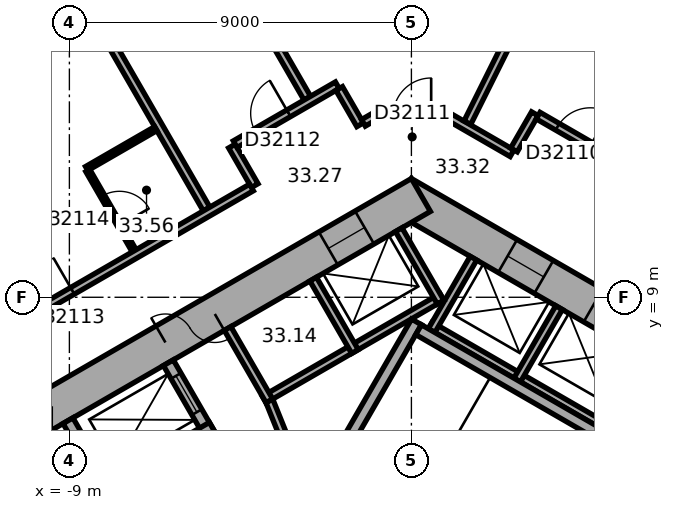
"""IFC4 building model, lengths in metres.
Left out: names, types, materials, properties, quantities, classifications, styles, units other than length and angle.
Written with IfcOpenShell. Run it as: python <this file> out.ifc"""

import sys

from ifc_helpers import new_model, si_unit, direction, frame, frame_2d, origin, place, context, subcontext, project, spatial, rectangle, extrude, element, fill, save


model = new_model("IFC4")
c1 = context("Model", 3, precision=1e-05, world=origin(), true_north=direction((0.0, 1.0)))
c2 = subcontext(c1, "Body", "Model", "MODEL_VIEW")
j1 = project(units=[si_unit("LENGTHUNIT", "METRE"), si_unit("PLANEANGLEUNIT", "RADIAN")], contexts=[c1])
p1 = place(None, origin())
s1 = spatial("IfcSite", under=j1, at=p1, CompositionType="ELEMENT")
p2 = place(p1, origin())
s2 = spatial("IfcBuilding", under=s1, at=p2, CompositionType="ELEMENT")
p3 = place(p2, frame((0.0, 0.0, 135.5)))
s3 = spatial("IfcBuildingStorey", under=s2, at=p3, CompositionType="ELEMENT", Elevation=135.5)
p4 = place(p3, frame((10.25, 5.629, 0.0), z_axis=(0.0, 0.0, 1.0), x_axis=(-0.866022616891, 0.50000482701, 0.0)))
e1 = element("IfcWall", 1, at=p4, inside=s3, PredefinedType="SHEAR", context=c2, shape_type="SweptSolid", body=[
    extrude(rectangle(XDim=12.125, YDim=1.0, at=frame_2d((6.062, 0.0))), origin(), (0.0, 0.0, 1.0), 3.7),
])
p5 = place(p4, frame((2.612, 0.0, 0.0)))
e2 = element("IfcOpeningElement", 2, at=p5, cuts=e1, PredefinedType="OPENING", context=c2, shape_type="SweptSolid", body=[
    extrude(rectangle(XDim=1.1, YDim=2.1, at=frame_2d((0.55, 1.05))), frame((0.0, 0.51, 0.0), z_axis=(0.0, -1.0, 0.0), x_axis=(1.0, 0.0, 0.0)), (0.0, 0.0, 1.0), 1.02),
])
p6 = place(p4, frame((5.212, 0.0, 0.0)))
e3 = element("IfcOpeningElement", 3, at=p6, cuts=e1, PredefinedType="OPENING", context=c2, shape_type="SweptSolid", body=[
    extrude(rectangle(XDim=1.1, YDim=2.1, at=frame_2d((0.55, 1.05))), frame((0.0, 0.51, 0.0), z_axis=(0.0, -1.0, 0.0), x_axis=(1.0, 0.0, 0.0)), (0.0, 0.0, 1.0), 1.02),
])
p7 = place(p4, frame((7.812, 0.0, 0.0)))
e4 = element("IfcOpeningElement", 4, at=p7, cuts=e1, PredefinedType="OPENING", context=c2, shape_type="SweptSolid", body=[
    extrude(rectangle(XDim=1.1, YDim=2.1, at=frame_2d((0.55, 1.05))), frame((0.0, 0.51, 0.0), z_axis=(0.0, -1.0, 0.0), x_axis=(1.0, 0.0, 0.0)), (0.0, 0.0, 1.0), 1.02),
])
p8 = place(p3, frame((0.25, 11.691, 0.0), z_axis=(0.0, 0.0, 1.0), x_axis=(-0.866022616891, -0.50000482701, 0.0)))
e5 = element("IfcWall", 5, at=p8, inside=s3, PredefinedType="SHEAR", context=c2, shape_type="SweptSolid", body=[
    extrude(rectangle(XDim=12.125, YDim=1.0, at=frame_2d((6.062, 0.0))), origin(), (0.0, 0.0, 1.0), 3.7),
])
p9 = place(p8, frame((6.262, 0.0, 0.0)))
e6 = element("IfcOpeningElement", 6, at=p9, cuts=e5, PredefinedType="OPENING", context=c2, shape_type="SweptSolid", body=[
    extrude(rectangle(XDim=1.5, YDim=2.1, at=frame_2d((0.75, 1.05))), frame((0.0, 0.51, 0.0), z_axis=(0.0, -1.0, 0.0), x_axis=(1.0, 0.0, 0.0)), (0.0, 0.0, 1.0), 1.02),
])
p10 = place(p8, frame((1.712, 0.0, 0.0)))
e7 = element("IfcOpeningElement", 7, at=p10, cuts=e5, PredefinedType="OPENING", context=c2, shape_type="SweptSolid", body=[
    extrude(rectangle(XDim=1.1, YDim=2.1, at=frame_2d((0.55, 1.05))), frame((0.0, 0.51, 0.0), z_axis=(0.0, -1.0, 0.0), x_axis=(1.0, 0.0, 0.0)), (0.0, 0.0, 1.0), 1.02),
])
p11 = place(p3, frame((19.464, 14.599, 0.0), z_axis=(0.0, 0.0, 1.0), x_axis=(-0.894935755043, 0.446195018289, 0.0)))
e8 = element("IfcWall", 8, at=p11, inside=s3, PredefinedType="STANDARD", context=c2, shape_type="SweptSolid", body=[
    extrude(rectangle(XDim=20.044, YDim=0.2, at=frame_2d((10.022, 0.0))), origin(), (0.0, 0.0, 1.0), 3.7),
])
p12 = place(p11, frame((1.313, 0.0, 0.9)))
e9 = element("IfcOpeningElement", 9, at=p12, cuts=e8, PredefinedType="OPENING", context=c2, shape_type="SweptSolid", body=[
    extrude(rectangle(XDim=2.4, YDim=2.0, at=frame_2d((1.2, 1.0))), frame((0.0, 0.11, 0.0), z_axis=(0.0, -1.0, 0.0), x_axis=(1.0, 0.0, 0.0)), (0.0, 0.0, 1.0), 0.22),
])
p13 = place(p11, frame((5.067, 0.0, 0.9)))
e10 = element("IfcOpeningElement", 10, at=p13, cuts=e8, PredefinedType="OPENING", context=c2, shape_type="SweptSolid", body=[
    extrude(rectangle(XDim=2.4, YDim=2.0, at=frame_2d((1.2, 1.0))), frame((0.0, 0.11, 0.0), z_axis=(0.0, -1.0, 0.0), x_axis=(1.0, 0.0, 0.0)), (0.0, 0.0, 1.0), 0.22),
])
p14 = place(p11, frame((8.821, 0.0, 0.9)))
e11 = element("IfcOpeningElement", 11, at=p14, cuts=e8, PredefinedType="OPENING", context=c2, shape_type="SweptSolid", body=[
    extrude(rectangle(XDim=2.4, YDim=2.0, at=frame_2d((1.2, 1.0))), frame((0.0, 0.11, 0.0), z_axis=(0.0, -1.0, 0.0), x_axis=(1.0, 0.0, 0.0)), (0.0, 0.0, 1.0), 0.22),
])
p15 = place(p11, frame((12.575, 0.0, 0.9)))
e12 = element("IfcOpeningElement", 12, at=p15, cuts=e8, PredefinedType="OPENING", context=c2, shape_type="SweptSolid", body=[
    extrude(rectangle(XDim=2.4, YDim=2.0, at=frame_2d((1.2, 1.0))), frame((0.0, 0.11, 0.0), z_axis=(0.0, -1.0, 0.0), x_axis=(1.0, 0.0, 0.0)), (0.0, 0.0, 1.0), 0.22),
])
p16 = place(p11, frame((16.329, 0.0, 0.9)))
e13 = element("IfcOpeningElement", 13, at=p16, cuts=e8, PredefinedType="OPENING", context=c2, shape_type="SweptSolid", body=[
    extrude(rectangle(XDim=2.4, YDim=2.0, at=frame_2d((1.2, 1.0))), frame((0.0, 0.11, 0.0), z_axis=(0.0, -1.0, 0.0), x_axis=(1.0, 0.0, 0.0)), (0.0, 0.0, 1.0), 0.22),
])
p17 = place(p3, frame((-2.961, 23.405, 0.0), z_axis=(0.0, 0.0, 1.0), x_axis=(-0.866023315909, -0.500003616288, 0.0)))
e14 = element("IfcWall", 14, at=p17, inside=s3, PredefinedType="STANDARD", context=c2, shape_type="SweptSolid", body=[
    extrude(rectangle(XDim=20.044, YDim=0.2, at=frame_2d((10.022, 0.0))), origin(), (0.0, 0.0, 1.0), 3.7),
])
p18 = place(p17, frame((1.314, 0.0, 0.9)))
e15 = element("IfcOpeningElement", 15, at=p18, cuts=e14, PredefinedType="OPENING", context=c2, shape_type="SweptSolid", body=[
    extrude(rectangle(XDim=2.4, YDim=2.0, at=frame_2d((1.2, 1.0))), frame((0.0, 0.11, 0.0), z_axis=(0.0, -1.0, 0.0), x_axis=(1.0, 0.0, 0.0)), (0.0, 0.0, 1.0), 0.22),
])
p19 = place(p17, frame((5.069, 0.0, 0.9)))
e16 = element("IfcOpeningElement", 16, at=p19, cuts=e14, PredefinedType="OPENING", context=c2, shape_type="SweptSolid", body=[
    extrude(rectangle(XDim=2.4, YDim=2.0, at=frame_2d((1.2, 1.0))), frame((0.0, 0.11, 0.0), z_axis=(0.0, -1.0, 0.0), x_axis=(1.0, 0.0, 0.0)), (0.0, 0.0, 1.0), 0.22),
])
p20 = place(p17, frame((8.823, 0.0, 0.9)))
e17 = element("IfcOpeningElement", 17, at=p20, cuts=e14, PredefinedType="OPENING", context=c2, shape_type="SweptSolid", body=[
    extrude(rectangle(XDim=2.4, YDim=2.0, at=frame_2d((1.2, 1.0))), frame((0.0, 0.11, 0.0), z_axis=(0.0, -1.0, 0.0), x_axis=(1.0, 0.0, 0.0)), (0.0, 0.0, 1.0), 0.22),
])
p21 = place(p17, frame((12.577, 0.0, 0.9)))
e18 = element("IfcOpeningElement", 18, at=p21, cuts=e14, PredefinedType="OPENING", context=c2, shape_type="SweptSolid", body=[
    extrude(rectangle(XDim=2.4, YDim=2.0, at=frame_2d((1.2, 1.0))), frame((0.0, 0.11, 0.0), z_axis=(0.0, -1.0, 0.0), x_axis=(1.0, 0.0, 0.0)), (0.0, 0.0, 1.0), 0.22),
])
p22 = place(p17, frame((16.331, 0.0, 0.9)))
e19 = element("IfcOpeningElement", 19, at=p22, cuts=e14, PredefinedType="OPENING", context=c2, shape_type="SweptSolid", body=[
    extrude(rectangle(XDim=2.4, YDim=2.0, at=frame_2d((1.2, 1.0))), frame((0.0, 0.11, 0.0), z_axis=(0.0, -1.0, 0.0), x_axis=(1.0, 0.0, 0.0)), (0.0, 0.0, 1.0), 0.22),
])
p23 = place(p3, frame((7.424, 4.259, 0.0), z_axis=(0.0, 0.0, 1.0), x_axis=(-0.866026010844, 0.49999894854, 0.0)))
e20 = element("IfcWall", 20, at=p23, inside=s3, PredefinedType="PARTITIONING", context=c2, shape_type="SweptSolid", body=[
    extrude(rectangle(XDim=8.0, YDim=0.2, at=frame_2d((4.0, 0.0))), origin(), (0.0, 0.0, 1.0), 3.35),
])
for number, where, z_axis, x_axis in (
    (21, (2.784, 6.822, 0.0), (0.0, 0.0, 1.0), (0.5, 0.866, 0.0)),
    (22, (0.532, 8.122, 0.0), (0.0, 0.0, 1.0), (0.5, 0.866, 0.0)),
):
    element("IfcWall", number, at=place(p3, frame(where, z_axis=z_axis, x_axis=x_axis)), inside=s3, PredefinedType="PARTITIONING", context=c2, shape_type="SweptSolid", body=[
        extrude(rectangle(XDim=2.2, YDim=0.2, at=frame_2d((1.1, 0.0))), origin(), (0.0, 0.0, 1.0), 3.35),
    ])
p24 = place(p3, frame((0.803, 9.009, 0.0), z_axis=(0.0, 0.0, 1.0), x_axis=(-0.866028230842, -0.499995103361, 0.0)))
e23 = element("IfcWall", 23, at=p24, inside=s3, PredefinedType="PARTITIONING", context=c2, shape_type="SweptSolid", body=[
    extrude(rectangle(XDim=5.4, YDim=0.2, at=frame_2d((2.7, 0.0))), origin(), (0.0, 0.0, 1.0), 3.35),
])
p25 = place(p3, frame((0.767, 8.872, 0.0), z_axis=(0.0, 0.0, 1.0), x_axis=(-0.499994660107, 0.866028486751, 0.0)))
e24 = element("IfcWall", 24, at=p25, inside=s3, PredefinedType="PARTITIONING", context=c2, shape_type="SweptSolid", body=[
    extrude(rectangle(XDim=2.2, YDim=0.2, at=frame_2d((1.1, 0.0))), origin(), (0.0, 0.0, 1.0), 3.35),
])
for number, where, z_axis, x_axis in (
    (25, (-1.485, 7.572, 0.0), (0.0, 0.0, 1.0), (-0.5, 0.866, 0.0)),
    (26, (-3.737, 6.272, 0.0), (0.0, 0.0, 1.0), (-0.5, 0.866, 0.0)),
):
    element("IfcWall", number, at=place(p3, frame(where, z_axis=z_axis, x_axis=x_axis)), inside=s3, PredefinedType="PARTITIONING", context=c2, shape_type="SweptSolid", body=[
        extrude(rectangle(XDim=2.2, YDim=0.2, at=frame_2d((1.1, 0.0))), origin(), (0.0, 0.0, 1.0), 3.35),
    ])
p26 = place(p3, frame((-2.216, 4.282, 0.0), z_axis=(0.0, 0.0, 1.0), x_axis=(0.499977259774, 0.866038532462, 0.0)))
e27 = element("IfcWall", 27, at=p26, inside=s3, PredefinedType="SHEAR", context=c2, shape_type="SweptSolid", body=[
    extrude(rectangle(XDim=4.7, YDim=0.3, at=frame_2d((2.35, 0.0))), origin(), (0.0, 0.0, 1.0), 3.35),
])
p27 = place(p3, frame((6.303, 4.617, 0.0), z_axis=(0.0, 0.0, 1.0), x_axis=(-0.866027801685, 0.499995846692, 0.0)))
e28 = element("IfcWall", 28, at=p27, inside=s3, PredefinedType="SHEAR", context=c2, shape_type="SweptSolid", body=[
    extrude(rectangle(XDim=7.06, YDim=0.3, at=frame_2d((3.53, 0.0))), origin(), (0.0, 0.0, 1.0), 3.35),
])
p28 = place(p3, frame((-5.295, 5.372, 0.0), z_axis=(0.0, 0.0, 1.0), x_axis=(-0.500077893725, 0.86598042715, 0.0)))
e29 = element("IfcWall", 29, at=p28, inside=s3, PredefinedType="SHEAR", context=c2, shape_type="SweptSolid", body=[
    extrude(rectangle(XDim=2.2, YDim=0.3, at=frame_2d((1.1, 0.0))), origin(), (0.0, 0.0, 1.0), 3.35),
])
p29 = place(p28, frame((0.7, 0.0, 0.0)))
e30 = element("IfcOpeningElement", 30, at=p29, cuts=e29, PredefinedType="OPENING", context=c2, shape_type="SweptSolid", body=[
    extrude(rectangle(XDim=1.1, YDim=2.1, at=frame_2d((0.55, 1.05))), frame((0.0, 0.16, 0.0), z_axis=(0.0, -1.0, 0.0), x_axis=(1.0, 0.0, 0.0)), (0.0, 0.0, 1.0), 0.32),
])
p30 = place(p3, frame((-5.24, 5.577, 0.0), z_axis=(0.0, 0.0, 1.0), x_axis=(-0.866014461049, -0.500018952895, 0.0)))
e31 = element("IfcWall", 31, at=p30, inside=s3, PredefinedType="SHEAR", context=c2, shape_type="SweptSolid", body=[
    extrude(rectangle(XDim=3.35, YDim=0.3, at=frame_2d((1.675, 0.0))), origin(), (0.0, 0.0, 1.0), 3.35),
])
p31 = place(p3, frame((-7.937, 3.847, 0.0), z_axis=(0.0, 0.0, 1.0), x_axis=(-0.50002983664, 0.866008176907, 0.0)))
e32 = element("IfcWall", 32, at=p31, inside=s3, PredefinedType="SHEAR", context=c2, shape_type="SweptSolid", body=[
    extrude(rectangle(XDim=2.2, YDim=0.3, at=frame_2d((1.1, 0.0))), origin(), (0.0, 0.0, 1.0), 3.35),
])
p32 = place(p3, frame((-2.615, 3.487, 0.0), z_axis=(0.0, 0.0, 1.0), x_axis=(-0.373576831041, 0.92759924068, 0.0)))
e33 = element("IfcWall", 33, at=p32, inside=s3, PredefinedType="PARTITIONING", context=c2, shape_type="SweptSolid", body=[
    extrude(rectangle(XDim=3.002, YDim=0.2, at=frame_2d((1.501, 0.0))), origin(), (0.0, 0.0, 1.0), 3.35),
])
p33 = place(p3, frame((-9.515, 18.466, 0.0), z_axis=(0.0, 0.0, 1.0), x_axis=(0.500009360108, -0.866019999656, 0.0)))
e34 = element("IfcWall", 34, at=p33, inside=s3, PredefinedType="PARTITIONING", context=c2, shape_type="SweptSolid", body=[
    extrude(rectangle(XDim=8.25, YDim=0.2, at=frame_2d((4.125, 0.0))), origin(), (0.0, 0.0, 1.0), 2.55),
])
p34 = place(p3, frame((-8.545, 12.387, 0.0), z_axis=(0.0, 0.0, 1.0), x_axis=(0.866009402589, 0.500027713859, 0.0)))
e35 = element("IfcWall", 35, at=p34, inside=s3, PredefinedType="PARTITIONING", context=c2, shape_type="SweptSolid", body=[
    extrude(rectangle(XDim=2.1, YDim=0.12, at=frame_2d((1.05, 0.0))), origin(), (0.0, 0.0, 1.0), 3.35),
])
p35 = place(p3, frame((-7.295, 10.222, 0.0), z_axis=(0.0, 0.0, 1.0), x_axis=(-0.500002508028, 0.866023955769, 0.0)))
e36 = element("IfcWall", 36, at=p35, inside=s3, PredefinedType="PARTITIONING", context=c2, shape_type="SweptSolid", body=[
    extrude(rectangle(XDim=2.44, YDim=0.12, at=frame_2d((1.22, 0.0))), origin(), (0.0, 0.0, 1.0), 3.35),
])
p36 = place(p35, frame((0.77, 0.0, 0.0)))
e37 = element("IfcOpeningElement", 37, at=p36, cuts=e36, PredefinedType="OPENING", context=c2, shape_type="SweptSolid", body=[
    extrude(rectangle(XDim=0.9, YDim=2.1, at=frame_2d((0.45, 1.05))), frame((0.0, 0.07, 0.0), z_axis=(0.0, -1.0, 0.0), x_axis=(1.0, 0.0, 0.0)), (0.0, 0.0, 1.0), 0.14),
])
p37 = place(p3, frame((-6.264, 20.344, 0.0), z_axis=(0.0, 0.0, 1.0), x_axis=(0.500009260695, -0.866020057054, 0.0)))
e38 = element("IfcWall", 38, at=p37, inside=s3, PredefinedType="PARTITIONING", context=c2, shape_type="SweptSolid", body=[
    extrude(rectangle(XDim=7.049, YDim=0.2, at=frame_2d((3.524, 0.0))), origin(), (0.0, 0.0, 1.0), 3.35),
])
p38 = place(p3, frame((-4.723, 12.978, 0.0), z_axis=(0.0, 0.0, 1.0), x_axis=(0.500074377092, -0.865982457891, 0.0)))
e39 = element("IfcWall", 39, at=p38, inside=s3, PredefinedType="PARTITIONING", context=c2, shape_type="SweptSolid", body=[
    extrude(rectangle(XDim=1.201, YDim=0.2, at=frame_2d((0.601, 0.0))), origin(), (0.0, 0.0, 1.0), 3.35),
])
p39 = place(p3, frame((-4.209, 11.888, 0.0), z_axis=(0.0, 0.0, 1.0), x_axis=(-0.866020930448, -0.500007747966, 0.0)))
e40 = element("IfcWall", 40, at=p39, inside=s3, PredefinedType="PARTITIONING", context=c2, shape_type="SweptSolid", body=[
    extrude(rectangle(XDim=8.321, YDim=0.2, at=frame_2d((4.161, 0.0))), origin(), (0.0, 0.0, 1.0), 3.35),
])
p40 = place(p39, frame((5.439, 0.0, 0.0)))
e41 = element("IfcOpeningElement", 41, at=p40, cuts=e40, PredefinedType="OPENING", context=c2, shape_type="SweptSolid", body=[
    extrude(rectangle(XDim=1.0, YDim=2.1, at=frame_2d((0.5, 1.05))), frame((0.0, 0.11, 0.0), z_axis=(0.0, -1.0, 0.0), x_axis=(1.0, 0.0, 0.0)), (0.0, 0.0, 1.0), 0.22),
])
p41 = place(p3, frame((-1.95, 14.579, 0.0), z_axis=(0.0, 0.0, 1.0), x_axis=(-0.866011260204, -0.500024496599, 0.0)))
e42 = element("IfcWall", 42, at=p41, inside=s3, PredefinedType="PARTITIONING", context=c2, shape_type="SweptSolid", body=[
    extrude(rectangle(XDim=3.102, YDim=0.2, at=frame_2d((1.551, 0.0))), origin(), (0.0, 0.0, 1.0), 3.35),
])
p42 = place(p41, frame((1.478, 0.0, 0.0)))
e43 = element("IfcOpeningElement", 43, at=p42, cuts=e42, PredefinedType="OPENING", context=c2, shape_type="SweptSolid", body=[
    extrude(rectangle(XDim=1.0, YDim=2.1, at=frame_2d((0.5, 1.05))), frame((0.0, 0.11, 0.0), z_axis=(0.0, -1.0, 0.0), x_axis=(1.0, 0.0, 0.0)), (0.0, 0.0, 1.0), 0.22),
])
p43 = place(p3, frame((-1.349, 13.539, 0.0), z_axis=(0.0, 0.0, 1.0), x_axis=(-0.500074377092, 0.865982457891, 0.0)))
e44 = element("IfcWall", 44, at=p43, inside=s3, PredefinedType="PARTITIONING", context=c2, shape_type="SweptSolid", body=[
    extrude(rectangle(XDim=1.101, YDim=0.2, at=frame_2d((0.55, 0.0))), origin(), (0.0, 0.0, 1.0), 3.35),
])
p44 = place(p3, frame((-0.95, 13.77, 0.0), z_axis=(0.0, 0.0, 1.0), x_axis=(-0.865904111586, -0.500210025428, 0.0)))
e45 = element("IfcWall", 45, at=p44, inside=s3, PredefinedType="PARTITIONING", context=c2, shape_type="SweptSolid", body=[
    extrude(rectangle(XDim=0.361, YDim=0.2, at=frame_2d((0.181, 0.0))), origin(), (0.0, 0.0, 1.0), 3.35),
])
p45 = place(p3, frame((0.95, 13.77, 0.0), z_axis=(0.0, 0.0, 1.0), x_axis=(-1.0, 0.0, 0.0)))
e46 = element("IfcWall", 46, at=p45, inside=s3, PredefinedType="PARTITIONING", context=c2, shape_type="SweptSolid", body=[
    extrude(rectangle(XDim=1.86, YDim=0.2, at=frame_2d((0.93, 0.0))), origin(), (0.0, 0.0, 1.0), 3.35),
])
p46 = place(p45, frame((0.43, 0.0, 0.0)))
e47 = element("IfcOpeningElement", 47, at=p46, cuts=e46, PredefinedType="OPENING", context=c2, shape_type="SweptSolid", body=[
    extrude(rectangle(XDim=1.0, YDim=2.1, at=frame_2d((0.5, 1.05))), frame((0.0, 0.11, 0.0), z_axis=(0.0, -1.0, 0.0), x_axis=(1.0, 0.0, 0.0)), (0.0, 0.0, 1.0), 0.22),
])
p47 = place(p3, frame((2.648, 12.789, 0.0), z_axis=(0.0, 0.0, 1.0), x_axis=(-0.8660607342, 0.499938800931, 0.0)))
e48 = element("IfcWall", 48, at=p47, inside=s3, PredefinedType="PARTITIONING", context=c2, shape_type="SweptSolid", body=[
    extrude(rectangle(XDim=1.921, YDim=0.2, at=frame_2d((0.96, 0.0))), origin(), (0.0, 0.0, 1.0), 3.35),
])
p48 = place(p3, frame((3.249, 13.829, 0.0), z_axis=(0.0, 0.0, 1.0), x_axis=(-0.499812034598, -0.866133898465, 0.0)))
e49 = element("IfcWall", 49, at=p48, inside=s3, PredefinedType="PARTITIONING", context=c2, shape_type="SweptSolid", body=[
    extrude(rectangle(XDim=1.101, YDim=0.2, at=frame_2d((0.551, 0.0))), origin(), (0.0, 0.0, 1.0), 3.35),
])
p49 = place(p3, frame((5.01, 20.688, 0.0), z_axis=(0.0, 0.0, 1.0), x_axis=(-0.446203062394, -0.894931744386, 0.0)))
e50 = element("IfcWall", 50, at=p49, inside=s3, PredefinedType="PARTITIONING", context=c2, shape_type="SweptSolid", body=[
    extrude(rectangle(XDim=7.927, YDim=0.2, at=frame_2d((3.963, 0.0))), origin(), (0.0, 0.0, 1.0), 2.55),
])
p50 = place(p3, frame((11.646, 8.981, 0.0), z_axis=(0.0, 0.0, 1.0), x_axis=(-0.866027142779, 0.499996987961, 0.0)))
e51 = element("IfcWall", 51, at=p50, inside=s3, PredefinedType="PARTITIONING", context=c2, shape_type="SweptSolid", body=[
    extrude(rectangle(XDim=9.597, YDim=0.2, at=frame_2d((4.798, 0.0))), origin(), (0.0, 0.0, 1.0), 3.35),
])
p51 = place(p50, frame((1.331, 0.0, 0.0)))
e52 = element("IfcOpeningElement", 52, at=p51, cuts=e51, PredefinedType="OPENING", context=c2, shape_type="SweptSolid", body=[
    extrude(rectangle(XDim=1.0, YDim=2.1, at=frame_2d((0.5, 1.05))), frame((0.0, 0.11, 0.0), z_axis=(0.0, -1.0, 0.0), x_axis=(1.0, 0.0, 0.0)), (0.0, 0.0, 1.0), 0.22),
])
p52 = place(p50, frame((5.042, 0.0, 0.0)))
e53 = element("IfcOpeningElement", 53, at=p52, cuts=e51, PredefinedType="OPENING", context=c2, shape_type="SweptSolid", body=[
    extrude(rectangle(XDim=1.0, YDim=2.1, at=frame_2d((0.5, 1.05))), frame((0.0, 0.11, 0.0), z_axis=(0.0, -1.0, 0.0), x_axis=(1.0, 0.0, 0.0)), (0.0, 0.0, 1.0), 0.22),
])
p53 = place(p50, frame((8.01, 0.0, 0.0)))
e54 = element("IfcOpeningElement", 54, at=p53, cuts=e51, PredefinedType="OPENING", context=c2, shape_type="SweptSolid", body=[
    extrude(rectangle(XDim=1.0, YDim=2.1, at=frame_2d((0.5, 1.05))), frame((0.0, 0.11, 0.0), z_axis=(0.0, -1.0, 0.0), x_axis=(1.0, 0.0, 0.0)), (0.0, 0.0, 1.0), 0.22),
])
p54 = place(p9, origin())
e55 = element("IfcDoor", 55, at=p54, inside=s3, OperationType="DOUBLE_DOOR_SINGLE_SWING", PredefinedType="DOOR", context=c2, shape_type="SweptSolid", body=[
    extrude(rectangle(XDim=1.5, YDim=2.1, at=frame_2d((0.75, 1.05))), frame((0.0, 0.025, 0.0), z_axis=(0.0, -1.0, 0.0), x_axis=(1.0, 0.0, 0.0)), (0.0, 0.0, 1.0), 0.05),
])
fill(e6, e55)
p55 = place(p29, origin())
e56 = element("IfcDoor", 56, at=p55, inside=s3, OperationType="DOUBLE_DOOR_SLIDING", PredefinedType="DOOR", context=c2, shape_type="SweptSolid", body=[
    extrude(rectangle(XDim=1.1, YDim=2.1, at=frame_2d((0.55, 1.05))), frame((0.0, 0.025, 0.0), z_axis=(0.0, -1.0, 0.0), x_axis=(1.0, 0.0, 0.0)), (0.0, 0.0, 1.0), 0.05),
])
fill(e30, e56)
p56 = place(p6, origin())
e57 = element("IfcDoor", 57, at=p56, inside=s3, OperationType="DOUBLE_DOOR_SLIDING", PredefinedType="DOOR", context=c2, shape_type="SweptSolid", body=[
    extrude(rectangle(XDim=1.1, YDim=2.1, at=frame_2d((0.55, 1.05))), frame((0.0, 0.025, 0.0), z_axis=(0.0, -1.0, 0.0), x_axis=(1.0, 0.0, 0.0)), (0.0, 0.0, 1.0), 0.05),
])
fill(e3, e57)
p57 = place(p7, origin())
e58 = element("IfcDoor", 58, at=p57, inside=s3, OperationType="DOUBLE_DOOR_SLIDING", PredefinedType="DOOR", context=c2, shape_type="SweptSolid", body=[
    extrude(rectangle(XDim=1.1, YDim=2.1, at=frame_2d((0.55, 1.05))), frame((0.0, 0.025, 0.0), z_axis=(0.0, -1.0, 0.0), x_axis=(1.0, 0.0, 0.0)), (0.0, 0.0, 1.0), 0.05),
])
fill(e4, e58)
p58 = place(p10, origin())
e59 = element("IfcDoor", 59, at=p58, inside=s3, OperationType="DOUBLE_DOOR_SLIDING", PredefinedType="DOOR", context=c2, shape_type="SweptSolid", body=[
    extrude(rectangle(XDim=1.1, YDim=2.1, at=frame_2d((0.55, 1.05))), frame((0.0, 0.025, 0.0), z_axis=(0.0, -1.0, 0.0), x_axis=(1.0, 0.0, 0.0)), (0.0, 0.0, 1.0), 0.05),
])
fill(e7, e59)
p59 = place(p53, origin())
e60 = element("IfcDoor", 60, at=p59, inside=s3, OperationType="SINGLE_SWING_LEFT", PredefinedType="DOOR", context=c2, shape_type="SweptSolid", body=[
    extrude(rectangle(XDim=1.0, YDim=2.1, at=frame_2d((0.5, 1.05))), frame((0.0, 0.025, 0.0), z_axis=(0.0, -1.0, 0.0), x_axis=(1.0, 0.0, 0.0)), (0.0, 0.0, 1.0), 0.05),
])
fill(e54, e60)
p60 = place(p46, origin())
e61 = element("IfcDoor", 61, at=p60, inside=s3, OperationType="SINGLE_SWING_LEFT", PredefinedType="DOOR", context=c2, shape_type="SweptSolid", body=[
    extrude(rectangle(XDim=1.0, YDim=2.1, at=frame_2d((0.5, 1.05))), frame((0.0, 0.025, 0.0), z_axis=(0.0, -1.0, 0.0), x_axis=(1.0, 0.0, 0.0)), (0.0, 0.0, 1.0), 0.05),
])
fill(e47, e61)
p61 = place(p42, origin())
e62 = element("IfcDoor", 62, at=p61, inside=s3, OperationType="SINGLE_SWING_LEFT", PredefinedType="DOOR", context=c2, shape_type="SweptSolid", body=[
    extrude(rectangle(XDim=1.0, YDim=2.1, at=frame_2d((0.5, 1.05))), frame((0.0, 0.025, 0.0), z_axis=(0.0, -1.0, 0.0), x_axis=(1.0, 0.0, 0.0)), (0.0, 0.0, 1.0), 0.05),
])
fill(e43, e62)
p62 = place(p40, origin())
e63 = element("IfcDoor", 63, at=p62, inside=s3, OperationType="SINGLE_SWING_LEFT", PredefinedType="DOOR", context=c2, shape_type="SweptSolid", body=[
    extrude(rectangle(XDim=1.0, YDim=2.1, at=frame_2d((0.5, 1.05))), frame((0.0, 0.025, 0.0), z_axis=(0.0, -1.0, 0.0), x_axis=(1.0, 0.0, 0.0)), (0.0, 0.0, 1.0), 0.05),
])
fill(e41, e63)
p63 = place(p36, origin())
e64 = element("IfcDoor", 64, at=p63, inside=s3, OperationType="SINGLE_SWING_LEFT", PredefinedType="DOOR", context=c2, shape_type="SweptSolid", body=[
    extrude(rectangle(XDim=0.9, YDim=2.1, at=frame_2d((0.45, 1.05))), frame((0.0, 0.025, 0.0), z_axis=(0.0, -1.0, 0.0), x_axis=(1.0, 0.0, 0.0)), (0.0, 0.0, 1.0), 0.05),
])
fill(e37, e64)
save(model, sys.argv[1])
